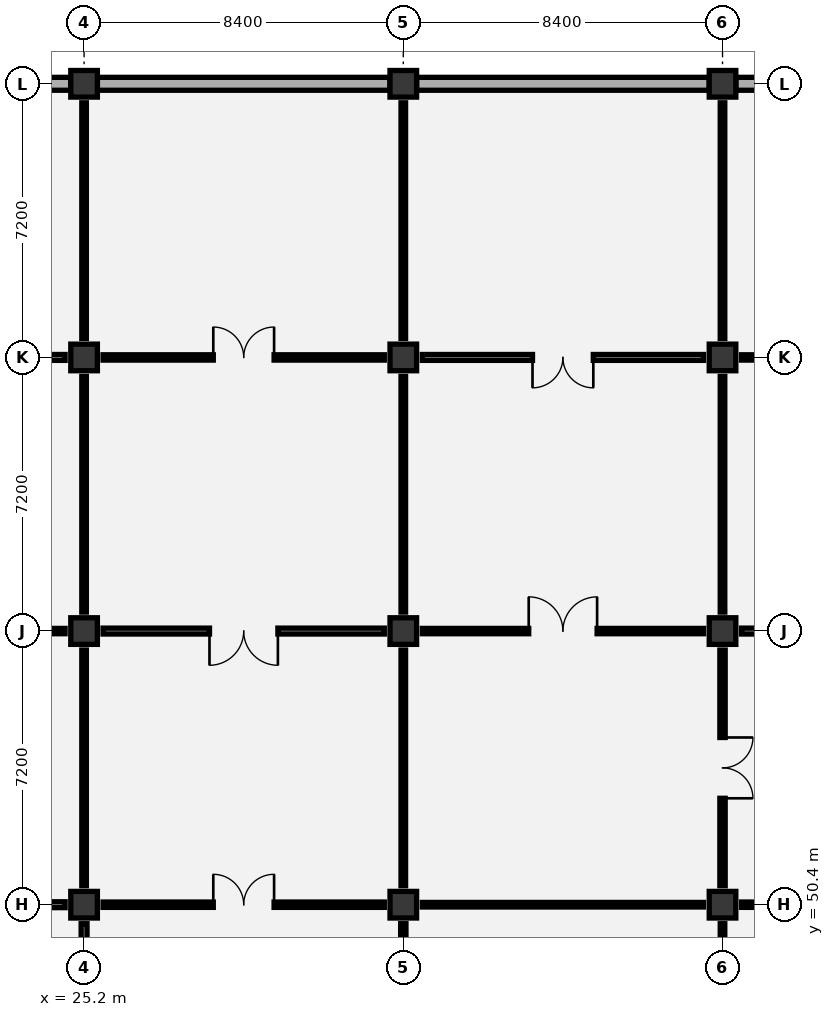
"""IFC4 building model, lengths in metres.
Left out: names, types, materials, properties, quantities, classifications, styles, units other than length and angle.
Written with IfcOpenShell. Run it as: python <this file> out.ifc"""

import sys

from ifc_helpers import new_model, si_unit, direction, frame, frame_2d, origin, origin_2d, place, context, subcontext, project, spatial, rectangle, extrude, element, fill, save


model = new_model("IFC4")
c1 = context("Model", 3, precision=1e-05, world=origin(), true_north=direction((0.0, 1.0)))
c2 = subcontext(c1, "Body", "Model", "MODEL_VIEW")
j1 = project(units=[si_unit("LENGTHUNIT", "METRE"), si_unit("PLANEANGLEUNIT", "RADIAN")], contexts=[c1])
p1 = place(None, origin())
s1 = spatial("IfcSite", under=j1, at=p1, CompositionType="ELEMENT")
p2 = place(p1, origin())
s2 = spatial("IfcBuilding", under=s1, at=p2, CompositionType="ELEMENT")
p3 = place(p2, frame((0.0, 0.0, 6.0)))
s3 = spatial("IfcBuildingStorey", under=s2, at=p3, CompositionType="ELEMENT", Elevation=6.0)
for number, where, z_axis, x_axis in (
    (1, (25.2, 50.4, 0.0), (0.0, 0.0, 1.0), (1.0, 0.0, 0.0)),
    (2, (25.2, 57.6, 0.0), (0.0, 0.0, 1.0), (1.0, 0.0, 0.0)),
    (3, (25.2, 64.8, 0.0), (0.0, 0.0, 1.0), (1.0, 0.0, 0.0)),
    (4, (25.2, 72.0, 0.0), (0.0, 0.0, 1.0), (1.0, 0.0, 0.0)),
    (5, (33.6, 50.4, 0.0), (0.0, 0.0, 1.0), (1.0, 0.0, 0.0)),
    (6, (33.6, 57.6, 0.0), (0.0, 0.0, 1.0), (1.0, 0.0, 0.0)),
    (7, (33.6, 64.8, 0.0), (0.0, 0.0, 1.0), (1.0, 0.0, 0.0)),
    (8, (33.6, 72.0, 0.0), (0.0, 0.0, 1.0), (1.0, 0.0, 0.0)),
    (9, (42.0, 50.4, 0.0), (0.0, 0.0, 1.0), (1.0, 0.0, 0.0)),
    (10, (42.0, 57.6, 0.0), (0.0, 0.0, 1.0), (1.0, 0.0, 0.0)),
    (11, (42.0, 64.8, 0.0), (0.0, 0.0, 1.0), (1.0, 0.0, 0.0)),
    (12, (42.0, 72.0, 0.0), (0.0, 0.0, 1.0), (1.0, 0.0, 0.0)),
):
    element("IfcColumn", number, at=place(p3, frame(where, z_axis=z_axis, x_axis=x_axis)), inside=s3, PredefinedType="COLUMN", context=c2, shape_type="SweptSolid", body=[
        extrude(rectangle(XDim=0.7, YDim=0.7, at=origin_2d()), origin(), (0.0, 0.0, 1.0), 5.4),
    ])
p4 = place(p3, frame((17.15, 72.0, 0.0), z_axis=(0.0, 0.0, 1.0), x_axis=(1.0, 0.0, 0.0)))
e13 = element("IfcWall", 13, at=p4, inside=s3, PredefinedType="SOLIDWALL", context=c2, shape_type="SweptSolid", body=[
    extrude(rectangle(XDim=7.7, YDim=0.34, at=frame_2d((3.85, 0.0))), origin(), (0.0, 0.0, 1.0), 4.42),
])
for number, where, z_axis, x_axis in (
    (14, (25.55, 72.0, 0.0), (0.0, 0.0, 1.0), (1.0, 0.0, 0.0)),
    (15, (33.95, 72.0, 0.0), (0.0, 0.0, 1.0), (1.0, 0.0, 0.0)),
    (16, (42.35, 72.0, 0.0), (0.0, 0.0, 1.0), (1.0, 0.0, 0.0)),
):
    element("IfcWall", number, at=place(p3, frame(where, z_axis=z_axis, x_axis=x_axis)), inside=s3, PredefinedType="SOLIDWALL", context=c2, shape_type="SweptSolid", body=[
        extrude(rectangle(XDim=7.7, YDim=0.34, at=frame_2d((3.85, 0.0))), origin(), (0.0, 0.0, 1.0), 4.42),
    ])
p5 = place(p3, frame((25.2, 43.7, 0.0), z_axis=(0.0, 0.0, 1.0), x_axis=(0.0, 1.0, 0.0)))
e17 = element("IfcWall", 17, at=p5, inside=s3, PredefinedType="PARTITIONING", context=c2, shape_type="SweptSolid", body=[
    extrude(rectangle(XDim=6.2, YDim=0.155, at=frame_2d((3.1, 0.0))), origin(), (0.0, 0.0, 1.0), 4.57),
])
p6 = place(p5, frame((2.3, 0.0, 0.0)))
e18 = element("IfcOpeningElement", 18, at=p6, cuts=e17, PredefinedType="OPENING", context=c2, shape_type="SweptSolid", body=[
    extrude(rectangle(XDim=1.6, YDim=2.2, at=frame_2d((0.8, 1.1))), frame((0.0, 0.087, 0.0), z_axis=(0.0, -1.0, 0.0), x_axis=(1.0, 0.0, 0.0)), (0.0, 0.0, 1.0), 0.175),
])
p7 = place(p3, frame((17.3, 50.4, 0.0), z_axis=(0.0, 0.0, 1.0), x_axis=(1.0, 0.0, 0.0)))
e19 = element("IfcWall", 19, at=p7, inside=s3, PredefinedType="PARTITIONING", context=c2, shape_type="SweptSolid", body=[
    extrude(rectangle(XDim=7.4, YDim=0.155, at=frame_2d((3.7, 0.0))), origin(), (0.0, 0.0, 1.0), 4.27),
])
p8 = place(p7, frame((2.8, 0.0, 0.0)))
e20 = element("IfcOpeningElement", 20, at=p8, cuts=e19, PredefinedType="OPENING", context=c2, shape_type="SweptSolid", body=[
    extrude(rectangle(XDim=1.8, YDim=2.25, at=frame_2d((0.9, 1.125))), frame((0.0, 0.087, 0.0), z_axis=(0.0, -1.0, 0.0), x_axis=(1.0, 0.0, 0.0)), (0.0, 0.0, 1.0), 0.175),
])
p9 = place(p3, frame((25.2, 50.9, 0.0), z_axis=(0.0, 0.0, 1.0), x_axis=(0.0, 1.0, 0.0)))
e21 = element("IfcWall", 21, at=p9, inside=s3, PredefinedType="PARTITIONING", context=c2, shape_type="SweptSolid", body=[
    extrude(rectangle(XDim=6.2, YDim=0.12, at=frame_2d((3.1, 0.0))), origin(), (0.0, 0.0, 1.0), 4.32),
])
p10 = place(p3, frame((17.3, 57.6, 0.0), z_axis=(0.0, 0.0, 1.0), x_axis=(1.0, 0.0, 0.0)))
e22 = element("IfcWall", 22, at=p10, inside=s3, PredefinedType="PARTITIONING", context=c2, shape_type="SweptSolid", body=[
    extrude(rectangle(XDim=7.4, YDim=0.14, at=frame_2d((3.7, 0.0))), origin(), (0.0, 0.0, 1.0), 4.27),
])
p11 = place(p10, frame((2.9, 0.0, 0.0)))
e23 = element("IfcOpeningElement", 23, at=p11, cuts=e22, PredefinedType="OPENING", context=c2, shape_type="SweptSolid", body=[
    extrude(rectangle(XDim=1.6, YDim=2.2, at=frame_2d((0.8, 1.1))), frame((0.0, 0.08, 0.0), z_axis=(0.0, -1.0, 0.0), x_axis=(1.0, 0.0, 0.0)), (0.0, 0.0, 1.0), 0.16),
])
p12 = place(p3, frame((25.2, 58.1, 0.0), z_axis=(0.0, 0.0, 1.0), x_axis=(0.0, 1.0, 0.0)))
e24 = element("IfcWall", 24, at=p12, inside=s3, PredefinedType="PARTITIONING", context=c2, shape_type="SweptSolid", body=[
    extrude(rectangle(XDim=6.2, YDim=0.12, at=frame_2d((3.1, 0.0))), origin(), (0.0, 0.0, 1.0), 4.67),
])
p13 = place(p3, frame((17.3, 64.8, 0.0), z_axis=(0.0, 0.0, 1.0), x_axis=(1.0, 0.0, 0.0)))
e25 = element("IfcWall", 25, at=p13, inside=s3, PredefinedType="PARTITIONING", context=c2, shape_type="SweptSolid", body=[
    extrude(rectangle(XDim=7.4, YDim=0.155, at=frame_2d((3.7, 0.0))), origin(), (0.0, 0.0, 1.0), 4.27),
])
p14 = place(p13, frame((2.8, 0.0, 0.0)))
e26 = element("IfcOpeningElement", 26, at=p14, cuts=e25, PredefinedType="OPENING", context=c2, shape_type="SweptSolid", body=[
    extrude(rectangle(XDim=1.8, YDim=2.25, at=frame_2d((0.9, 1.125))), frame((0.0, 0.087, 0.0), z_axis=(0.0, -1.0, 0.0), x_axis=(1.0, 0.0, 0.0)), (0.0, 0.0, 1.0), 0.175),
])
p15 = place(p3, frame((25.2, 65.3, 0.0), z_axis=(0.0, 0.0, 1.0), x_axis=(0.0, 1.0, 0.0)))
e27 = element("IfcWall", 27, at=p15, inside=s3, PredefinedType="PARTITIONING", context=c2, shape_type="SweptSolid", body=[
    extrude(rectangle(XDim=6.2, YDim=0.12, at=frame_2d((3.1, 0.0))), origin(), (0.0, 0.0, 1.0), 4.32),
])
p16 = place(p3, frame((33.6, 43.7, 0.0), z_axis=(0.0, 0.0, 1.0), x_axis=(0.0, 1.0, 0.0)))
e28 = element("IfcWall", 28, at=p16, inside=s3, PredefinedType="PARTITIONING", context=c2, shape_type="SweptSolid", body=[
    extrude(rectangle(XDim=6.2, YDim=0.14, at=frame_2d((3.1, 0.0))), origin(), (0.0, 0.0, 1.0), 4.32),
])
p17 = place(p16, frame((2.2, 0.0, 0.0)))
e29 = element("IfcOpeningElement", 29, at=p17, cuts=e28, PredefinedType="OPENING", context=c2, shape_type="SweptSolid", body=[
    extrude(rectangle(XDim=1.8, YDim=2.25, at=frame_2d((0.9, 1.125))), frame((0.0, 0.08, 0.0), z_axis=(0.0, -1.0, 0.0), x_axis=(1.0, 0.0, 0.0)), (0.0, 0.0, 1.0), 0.16),
])
p18 = place(p3, frame((25.7, 50.4, 0.0), z_axis=(0.0, 0.0, 1.0), x_axis=(1.0, 0.0, 0.0)))
e30 = element("IfcWall", 30, at=p18, inside=s3, PredefinedType="PARTITIONING", context=c2, shape_type="SweptSolid", body=[
    extrude(rectangle(XDim=7.4, YDim=0.14, at=frame_2d((3.7, 0.0))), origin(), (0.0, 0.0, 1.0), 4.27),
])
p19 = place(p18, frame((2.9, 0.0, 0.0)))
e31 = element("IfcOpeningElement", 31, at=p19, cuts=e30, PredefinedType="OPENING", context=c2, shape_type="SweptSolid", body=[
    extrude(rectangle(XDim=1.6, YDim=2.2, at=frame_2d((0.8, 1.1))), frame((0.0, 0.08, 0.0), z_axis=(0.0, -1.0, 0.0), x_axis=(1.0, 0.0, 0.0)), (0.0, 0.0, 1.0), 0.16),
])
p20 = place(p3, frame((33.6, 50.9, 0.0), z_axis=(0.0, 0.0, 1.0), x_axis=(0.0, 1.0, 0.0)))
e32 = element("IfcWall", 32, at=p20, inside=s3, PredefinedType="PARTITIONING", context=c2, shape_type="SweptSolid", body=[
    extrude(rectangle(XDim=6.2, YDim=0.12, at=frame_2d((3.1, 0.0))), origin(), (0.0, 0.0, 1.0), 4.67),
])
p21 = place(p3, frame((25.7, 57.6, 0.0), z_axis=(0.0, 0.0, 1.0), x_axis=(1.0, 0.0, 0.0)))
e33 = element("IfcWall", 33, at=p21, inside=s3, PredefinedType="PARTITIONING", context=c2, shape_type="SweptSolid", body=[
    extrude(rectangle(XDim=7.4, YDim=0.155, at=frame_2d((3.7, 0.0))), origin(), (0.0, 0.0, 1.0), 4.27),
])
p22 = place(p21, frame((2.8, 0.0, 0.0)))
e34 = element("IfcOpeningElement", 34, at=p22, cuts=e33, PredefinedType="OPENING", context=c2, shape_type="SweptSolid", body=[
    extrude(rectangle(XDim=1.8, YDim=2.25, at=frame_2d((0.9, 1.125))), frame((0.0, 0.087, 0.0), z_axis=(0.0, -1.0, 0.0), x_axis=(1.0, 0.0, 0.0)), (0.0, 0.0, 1.0), 0.175),
])
p23 = place(p3, frame((33.6, 58.1, 0.0), z_axis=(0.0, 0.0, 1.0), x_axis=(0.0, 1.0, 0.0)))
e35 = element("IfcWall", 35, at=p23, inside=s3, PredefinedType="PARTITIONING", context=c2, shape_type="SweptSolid", body=[
    extrude(rectangle(XDim=6.2, YDim=0.12, at=frame_2d((3.1, 0.0))), origin(), (0.0, 0.0, 1.0), 4.32),
])
p24 = place(p3, frame((25.7, 64.8, 0.0), z_axis=(0.0, 0.0, 1.0), x_axis=(1.0, 0.0, 0.0)))
e36 = element("IfcWall", 36, at=p24, inside=s3, PredefinedType="PARTITIONING", context=c2, shape_type="SweptSolid", body=[
    extrude(rectangle(XDim=7.4, YDim=0.14, at=frame_2d((3.7, 0.0))), origin(), (0.0, 0.0, 1.0), 4.27),
])
p25 = place(p24, frame((2.9, 0.0, 0.0)))
e37 = element("IfcOpeningElement", 37, at=p25, cuts=e36, PredefinedType="OPENING", context=c2, shape_type="SweptSolid", body=[
    extrude(rectangle(XDim=1.6, YDim=2.2, at=frame_2d((0.8, 1.1))), frame((0.0, 0.08, 0.0), z_axis=(0.0, -1.0, 0.0), x_axis=(1.0, 0.0, 0.0)), (0.0, 0.0, 1.0), 0.16),
])
p26 = place(p3, frame((33.6, 65.3, 0.0), z_axis=(0.0, 0.0, 1.0), x_axis=(0.0, 1.0, 0.0)))
e38 = element("IfcWall", 38, at=p26, inside=s3, PredefinedType="PARTITIONING", context=c2, shape_type="SweptSolid", body=[
    extrude(rectangle(XDim=6.2, YDim=0.12, at=frame_2d((3.1, 0.0))), origin(), (0.0, 0.0, 1.0), 4.78),
])
p27 = place(p3, frame((42.0, 43.7, 0.0), z_axis=(0.0, 0.0, 1.0), x_axis=(0.0, 1.0, 0.0)))
e39 = element("IfcWall", 39, at=p27, inside=s3, PredefinedType="PARTITIONING", context=c2, shape_type="SweptSolid", body=[
    extrude(rectangle(XDim=6.2, YDim=0.12, at=frame_2d((3.1, 0.0))), origin(), (0.0, 0.0, 1.0), 4.67),
])
p28 = place(p3, frame((34.1, 50.4, 0.0), z_axis=(0.0, 0.0, 1.0), x_axis=(1.0, 0.0, 0.0)))
e40 = element("IfcWall", 40, at=p28, inside=s3, PredefinedType="PARTITIONING", context=c2, shape_type="SweptSolid", body=[
    extrude(rectangle(XDim=7.4, YDim=0.12, at=frame_2d((3.7, 0.0))), origin(), (0.0, 0.0, 1.0), 4.27),
])
p29 = place(p3, frame((42.0, 50.9, 0.0), z_axis=(0.0, 0.0, 1.0), x_axis=(0.0, 1.0, 0.0)))
e41 = element("IfcWall", 41, at=p29, inside=s3, PredefinedType="PARTITIONING", context=c2, shape_type="SweptSolid", body=[
    extrude(rectangle(XDim=6.2, YDim=0.14, at=frame_2d((3.1, 0.0))), origin(), (0.0, 0.0, 1.0), 4.32),
])
p30 = place(p29, frame((2.3, 0.0, 0.0)))
e42 = element("IfcOpeningElement", 42, at=p30, cuts=e41, PredefinedType="OPENING", context=c2, shape_type="SweptSolid", body=[
    extrude(rectangle(XDim=1.6, YDim=2.2, at=frame_2d((0.8, 1.1))), frame((0.0, 0.08, 0.0), z_axis=(0.0, -1.0, 0.0), x_axis=(1.0, 0.0, 0.0)), (0.0, 0.0, 1.0), 0.16),
])
p31 = place(p3, frame((34.1, 57.6, 0.0), z_axis=(0.0, 0.0, 1.0), x_axis=(1.0, 0.0, 0.0)))
e43 = element("IfcWall", 43, at=p31, inside=s3, PredefinedType="PARTITIONING", context=c2, shape_type="SweptSolid", body=[
    extrude(rectangle(XDim=7.4, YDim=0.14, at=frame_2d((3.7, 0.0))), origin(), (0.0, 0.0, 1.0), 4.27),
])
p32 = place(p31, frame((2.8, 0.0, 0.0)))
e44 = element("IfcOpeningElement", 44, at=p32, cuts=e43, PredefinedType="OPENING", context=c2, shape_type="SweptSolid", body=[
    extrude(rectangle(XDim=1.8, YDim=2.25, at=frame_2d((0.9, 1.125))), frame((0.0, 0.08, 0.0), z_axis=(0.0, -1.0, 0.0), x_axis=(1.0, 0.0, 0.0)), (0.0, 0.0, 1.0), 0.16),
])
p33 = place(p3, frame((42.0, 58.1, 0.0), z_axis=(0.0, 0.0, 1.0), x_axis=(0.0, 1.0, 0.0)))
e45 = element("IfcWall", 45, at=p33, inside=s3, PredefinedType="PARTITIONING", context=c2, shape_type="SweptSolid", body=[
    extrude(rectangle(XDim=6.2, YDim=0.12, at=frame_2d((3.1, 0.0))), origin(), (0.0, 0.0, 1.0), 4.78),
])
p34 = place(p3, frame((34.1, 64.8, 0.0), z_axis=(0.0, 0.0, 1.0), x_axis=(1.0, 0.0, 0.0)))
e46 = element("IfcWall", 46, at=p34, inside=s3, PredefinedType="PARTITIONING", context=c2, shape_type="SweptSolid", body=[
    extrude(rectangle(XDim=7.4, YDim=0.155, at=frame_2d((3.7, 0.0))), origin(), (0.0, 0.0, 1.0), 4.27),
])
p35 = place(p34, frame((2.9, 0.0, 0.0)))
e47 = element("IfcOpeningElement", 47, at=p35, cuts=e46, PredefinedType="OPENING", context=c2, shape_type="SweptSolid", body=[
    extrude(rectangle(XDim=1.6, YDim=2.2, at=frame_2d((0.8, 1.1))), frame((0.0, 0.087, 0.0), z_axis=(0.0, -1.0, 0.0), x_axis=(1.0, 0.0, 0.0)), (0.0, 0.0, 1.0), 0.175),
])
p36 = place(p3, frame((42.0, 65.3, 0.0), z_axis=(0.0, 0.0, 1.0), x_axis=(0.0, 1.0, 0.0)))
e48 = element("IfcWall", 48, at=p36, inside=s3, PredefinedType="PARTITIONING", context=c2, shape_type="SweptSolid", body=[
    extrude(rectangle(XDim=6.2, YDim=0.12, at=frame_2d((3.1, 0.0))), origin(), (0.0, 0.0, 1.0), 4.32),
])
p37 = place(p3, frame((42.5, 50.4, 0.0), z_axis=(0.0, 0.0, 1.0), x_axis=(1.0, 0.0, 0.0)))
e49 = element("IfcWall", 49, at=p37, inside=s3, PredefinedType="PARTITIONING", context=c2, shape_type="SweptSolid", body=[
    extrude(rectangle(XDim=7.4, YDim=0.14, at=frame_2d((3.7, 0.0))), origin(), (0.0, 0.0, 1.0), 4.27),
])
p38 = place(p37, frame((2.8, 0.0, 0.0)))
e50 = element("IfcOpeningElement", 50, at=p38, cuts=e49, PredefinedType="OPENING", context=c2, shape_type="SweptSolid", body=[
    extrude(rectangle(XDim=1.8, YDim=2.25, at=frame_2d((0.9, 1.125))), frame((0.0, 0.08, 0.0), z_axis=(0.0, -1.0, 0.0), x_axis=(1.0, 0.0, 0.0)), (0.0, 0.0, 1.0), 0.16),
])
p39 = place(p3, frame((42.5, 57.6, 0.0), z_axis=(0.0, 0.0, 1.0), x_axis=(1.0, 0.0, 0.0)))
e51 = element("IfcWall", 51, at=p39, inside=s3, PredefinedType="PARTITIONING", context=c2, shape_type="SweptSolid", body=[
    extrude(rectangle(XDim=7.4, YDim=0.155, at=frame_2d((3.7, 0.0))), origin(), (0.0, 0.0, 1.0), 4.27),
])
p40 = place(p39, frame((2.8, 0.0, 0.0)))
e52 = element("IfcOpeningElement", 52, at=p40, cuts=e51, PredefinedType="OPENING", context=c2, shape_type="SweptSolid", body=[
    extrude(rectangle(XDim=1.8, YDim=2.25, at=frame_2d((0.9, 1.125))), frame((0.0, 0.087, 0.0), z_axis=(0.0, -1.0, 0.0), x_axis=(1.0, 0.0, 0.0)), (0.0, 0.0, 1.0), 0.175),
])
p41 = place(p3, frame((42.5, 64.8, 0.0), z_axis=(0.0, 0.0, 1.0), x_axis=(1.0, 0.0, 0.0)))
e53 = element("IfcWall", 53, at=p41, inside=s3, PredefinedType="PARTITIONING", context=c2, shape_type="SweptSolid", body=[
    extrude(rectangle(XDim=7.4, YDim=0.14, at=frame_2d((3.7, 0.0))), origin(), (0.0, 0.0, 1.0), 4.27),
])
p42 = place(p41, frame((2.9, 0.0, 0.0)))
e54 = element("IfcOpeningElement", 54, at=p42, cuts=e53, PredefinedType="OPENING", context=c2, shape_type="SweptSolid", body=[
    extrude(rectangle(XDim=1.6, YDim=2.2, at=frame_2d((0.8, 1.1))), frame((0.0, 0.08, 0.0), z_axis=(0.0, -1.0, 0.0), x_axis=(1.0, 0.0, 0.0)), (0.0, 0.0, 1.0), 0.16),
])
p43 = place(p19, origin())
e55 = element("IfcDoor", 55, at=p43, inside=s3, OperationType="DOUBLE_DOOR_SINGLE_SWING", PredefinedType="DOOR", context=c2, shape_type="SweptSolid", body=[
    extrude(rectangle(XDim=1.6, YDim=2.2, at=frame_2d((0.8, 1.1))), frame((0.0, 0.025, 0.0), z_axis=(0.0, -1.0, 0.0), x_axis=(1.0, 0.0, 0.0)), (0.0, 0.0, 1.0), 0.05),
])
fill(e31, e55)
p44 = place(p22, frame((1.8, 0.0, 0.0), z_axis=(0.0, 0.0, 1.0), x_axis=(-1.0, 0.0, 0.0)))
e56 = element("IfcDoor", 56, at=p44, inside=s3, OperationType="DOUBLE_DOOR_SINGLE_SWING", PredefinedType="DOOR", context=c2, shape_type="SweptSolid", body=[
    extrude(rectangle(XDim=1.8, YDim=2.25, at=frame_2d((0.9, 1.125))), frame((0.0, 0.025, 0.0), z_axis=(0.0, -1.0, 0.0), x_axis=(1.0, 0.0, 0.0)), (0.0, 0.0, 1.0), 0.05),
])
fill(e34, e56)
p45 = place(p25, origin())
e57 = element("IfcDoor", 57, at=p45, inside=s3, OperationType="DOUBLE_DOOR_SINGLE_SWING", PredefinedType="DOOR", context=c2, shape_type="SweptSolid", body=[
    extrude(rectangle(XDim=1.6, YDim=2.2, at=frame_2d((0.8, 1.1))), frame((0.0, 0.025, 0.0), z_axis=(0.0, -1.0, 0.0), x_axis=(1.0, 0.0, 0.0)), (0.0, 0.0, 1.0), 0.05),
])
fill(e37, e57)
p46 = place(p30, frame((1.6, 0.0, 0.0), z_axis=(0.0, 0.0, 1.0), x_axis=(-1.0, 0.0, 0.0)))
e58 = element("IfcDoor", 58, at=p46, inside=s3, OperationType="DOUBLE_DOOR_SINGLE_SWING", PredefinedType="DOOR", context=c2, shape_type="SweptSolid", body=[
    extrude(rectangle(XDim=1.6, YDim=2.2, at=frame_2d((0.8, 1.1))), frame((0.0, 0.025, 0.0), z_axis=(0.0, -1.0, 0.0), x_axis=(1.0, 0.0, 0.0)), (0.0, 0.0, 1.0), 0.05),
])
fill(e42, e58)
p47 = place(p32, origin())
e59 = element("IfcDoor", 59, at=p47, inside=s3, OperationType="DOUBLE_DOOR_SINGLE_SWING", PredefinedType="DOOR", context=c2, shape_type="SweptSolid", body=[
    extrude(rectangle(XDim=1.8, YDim=2.25, at=frame_2d((0.9, 1.125))), frame((0.0, 0.025, 0.0), z_axis=(0.0, -1.0, 0.0), x_axis=(1.0, 0.0, 0.0)), (0.0, 0.0, 1.0), 0.05),
])
fill(e44, e59)
p48 = place(p35, frame((1.6, 0.0, 0.0), z_axis=(0.0, 0.0, 1.0), x_axis=(-1.0, 0.0, 0.0)))
e60 = element("IfcDoor", 60, at=p48, inside=s3, OperationType="DOUBLE_DOOR_SINGLE_SWING", PredefinedType="DOOR", context=c2, shape_type="SweptSolid", body=[
    extrude(rectangle(XDim=1.6, YDim=2.2, at=frame_2d((0.8, 1.1))), frame((0.0, 0.025, 0.0), z_axis=(0.0, -1.0, 0.0), x_axis=(1.0, 0.0, 0.0)), (0.0, 0.0, 1.0), 0.05),
])
fill(e47, e60)
save(model, sys.argv[1])
